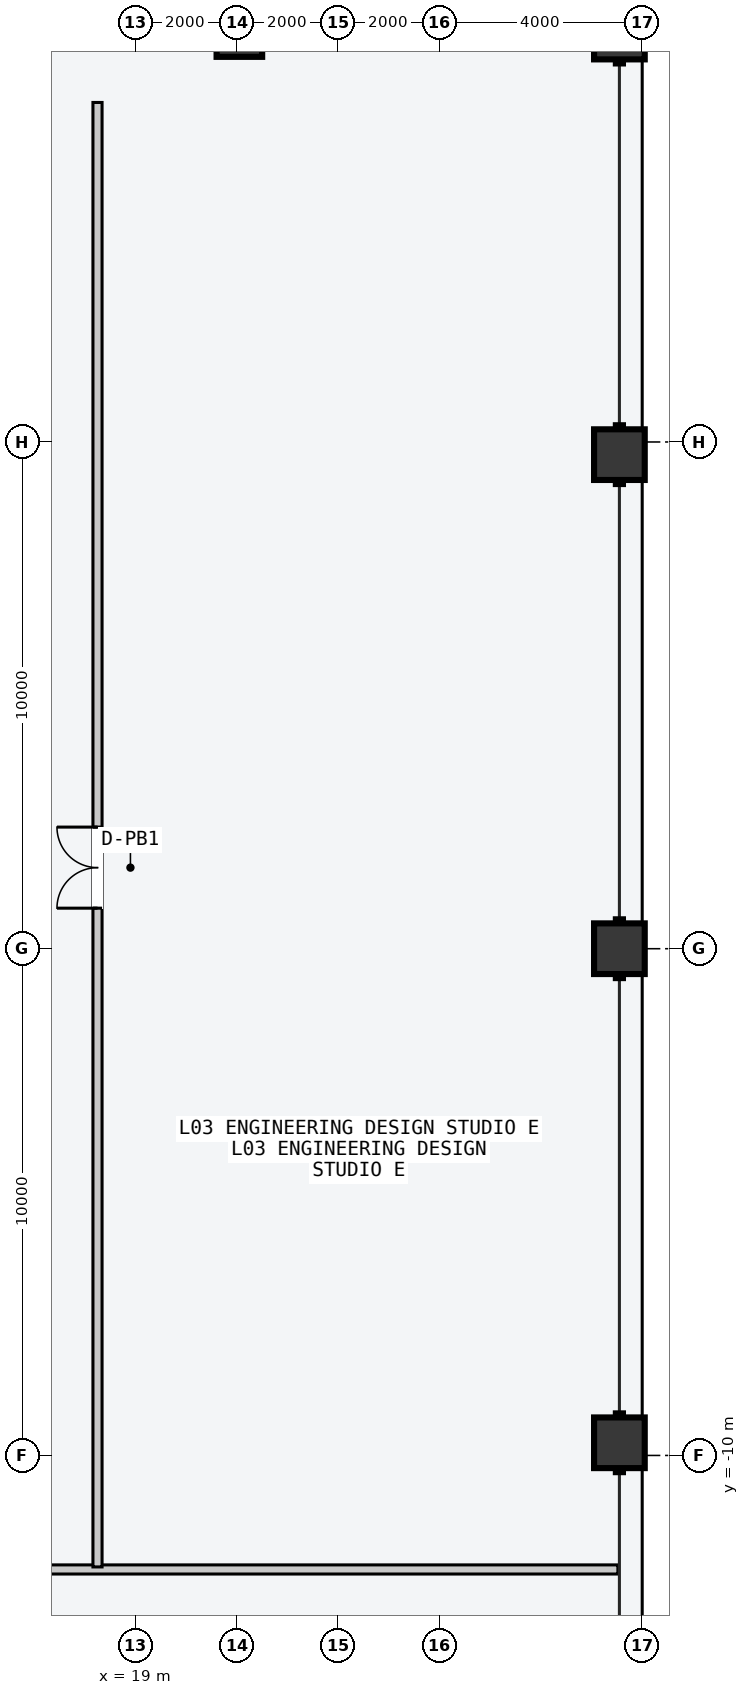
"""IFC4 building model, lengths in metres.
Left out: names, types, materials, properties, quantities, classifications, styles, units other than length and angle.
Written with IfcOpenShell. Run it as: python <this file> out.ifc"""

import sys

from ifc_helpers import new_model, si_unit, direction, frame, frame_2d, origin, origin_2d, place, context, subcontext, project, spatial, rectangle, hollow_rectangle, extrude, element, fill, save


model = new_model("IFC4")
c1 = context("Model", 3, precision=1e-05, world=origin(), true_north=direction((0.0, 1.0)))
c2 = subcontext(c1, "Body", "Model", "MODEL_VIEW")
j1 = project(units=[si_unit("LENGTHUNIT", "METRE"), si_unit("PLANEANGLEUNIT", "RADIAN")], contexts=[c1])
p1 = place(None, origin())
s1 = spatial("IfcSite", under=j1, at=p1, CompositionType="ELEMENT")
p2 = place(p1, origin())
s2 = spatial("IfcBuilding", under=s1, at=p2, CompositionType="ELEMENT")
p3 = place(p2, frame((0.0, 0.0, 14.4)))
s3 = spatial("IfcBuildingStorey", under=s2, at=p3, CompositionType="ELEMENT", Elevation=14.4)
p4 = place(p3, frame((21.05, 18.05, 0.0), z_axis=(0.0, 0.0, 1.0), x_axis=(1.0, 0.0, 0.0)))
e1 = element("IfcColumn", 1, at=p4, inside=s3, PredefinedType="COLUMN", context=c2, shape_type="SweptSolid", body=[
    extrude(hollow_rectangle(XDim=0.9, YDim=0.9, WallThickness=0.045, at=origin_2d()), origin(), (0.0, 0.0, 1.0), 4.8),
])
for number, where, z_axis, x_axis in (
    (2, (28.55, -9.75, 0.0), (0.0, 0.0, 1.0), (0.0, 1.0, 0.0)),
    (3, (28.55, 0.0, 0.0), (0.0, 0.0, 1.0), (0.0, 1.0, 0.0)),
    (4, (28.55, 9.75, 0.0), (0.0, 0.0, 1.0), (0.0, 1.0, 0.0)),
    (5, (28.55, 18.05, 0.0), (0.0, 0.0, 1.0), (0.0, 1.0, 0.0)),
):
    element("IfcColumn", number, at=place(p3, frame(where, z_axis=z_axis, x_axis=x_axis)), inside=s3, PredefinedType="COLUMN", context=c2, shape_type="SweptSolid", body=[
        extrude(hollow_rectangle(XDim=1.0, YDim=1.0, WallThickness=0.05, at=origin_2d()), origin(), (0.0, 0.0, 1.0), 4.8),
    ])
p5 = place(p3, frame((-28.52, -12.25, 0.0), z_axis=(0.0, 0.0, 1.0), x_axis=(1.0, 0.0, 0.0)))
e6 = element("IfcWall", 6, at=p5, inside=s3, PredefinedType="PARTITIONING", context=c2, shape_type="SweptSolid", body=[
    extrude(rectangle(XDim=57.04, YDim=0.18, at=frame_2d((28.52, 0.0))), origin(), (0.0, 0.0, 1.0), 4.58),
])
p6 = place(p5, frame((11.52, 0.0, 0.0)))
e7 = element("IfcOpeningElement", 7, at=p6, cuts=e6, PredefinedType="OPENING", context=c2, shape_type="SweptSolid", body=[
    extrude(rectangle(XDim=1.6, YDim=2.3, at=frame_2d((0.8, 1.15))), frame((0.0, 0.1, 0.0), z_axis=(0.0, -1.0, 0.0), x_axis=(1.0, 0.0, 0.0)), (0.0, 0.0, 1.0), 0.2),
])
p7 = place(p5, frame((27.72, 0.0, 0.0)))
e8 = element("IfcOpeningElement", 8, at=p7, cuts=e6, PredefinedType="OPENING", context=c2, shape_type="SweptSolid", body=[
    extrude(rectangle(XDim=1.6, YDim=2.3, at=frame_2d((0.8, 1.15))), frame((0.0, 0.1, 0.0), z_axis=(0.0, -1.0, 0.0), x_axis=(1.0, 0.0, 0.0)), (0.0, 0.0, 1.0), 0.2),
])
p8 = place(p5, frame((43.92, 0.0, 0.0)))
e9 = element("IfcOpeningElement", 9, at=p8, cuts=e6, PredefinedType="OPENING", context=c2, shape_type="SweptSolid", body=[
    extrude(rectangle(XDim=1.6, YDim=2.3, at=frame_2d((0.8, 1.15))), frame((0.0, 0.1, 0.0), z_axis=(0.0, -1.0, 0.0), x_axis=(1.0, 0.0, 0.0)), (0.0, 0.0, 1.0), 0.2),
])
p9 = place(p3, frame((18.25, -12.2, 0.0), z_axis=(0.0, 0.0, 1.0), x_axis=(0.0, 1.0, 0.0)))
e10 = element("IfcWall", 10, at=p9, inside=s3, PredefinedType="PARTITIONING", context=c2, shape_type="SweptSolid", body=[
    extrude(rectangle(XDim=28.9, YDim=0.18, at=frame_2d((14.45, 0.0))), origin(), (0.0, 0.0, 1.0), 4.58),
])
p10 = place(p9, frame((13.0, 0.0, 0.0)))
e11 = element("IfcOpeningElement", 11, at=p10, cuts=e10, PredefinedType="OPENING", context=c2, shape_type="SweptSolid", body=[
    extrude(rectangle(XDim=1.6, YDim=2.3, at=frame_2d((0.8, 1.15))), frame((0.0, 0.1, 0.0), z_axis=(0.0, -1.0, 0.0), x_axis=(1.0, 0.0, 0.0)), (0.0, 0.0, 1.0), 0.2),
])
p11 = place(p10, origin())
e12 = element("IfcDoor", 12, at=p11, inside=s3, OperationType="DOUBLE_DOOR_SINGLE_SWING", PredefinedType="DOOR", context=c2, shape_type="SweptSolid", body=[
    extrude(rectangle(XDim=1.6, YDim=2.3, at=frame_2d((0.8, 1.15))), frame((0.0, 0.025, 0.0), z_axis=(0.0, -1.0, 0.0), x_axis=(1.0, 0.0, 0.0)), (0.0, 0.0, 1.0), 0.05),
])
fill(e11, e12)
save(model, sys.argv[1])
